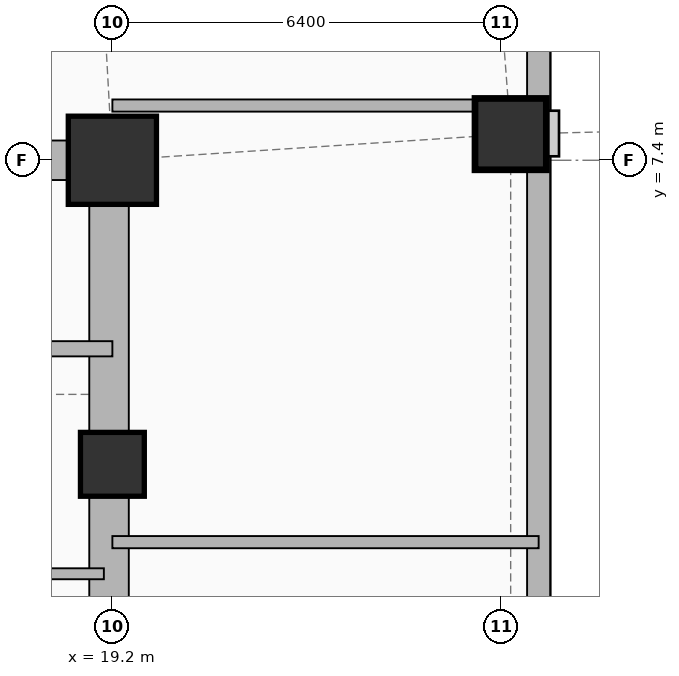
"""IFC4 building model, lengths in metres.
Left out: names, types, materials, properties, quantities, classifications, styles, units other than length and angle.
Written with IfcOpenShell. Run it as: python <this file> out.ifc"""

import sys

from ifc_helpers import new_model, si_unit, direction, frame, frame_2d, origin, origin_2d, place, context, subcontext, project, spatial, rectangle, hollow_rectangle, extrude, element, fill, save


model = new_model("IFC4")
c1 = context("Model", 3, precision=1e-05, world=origin(), true_north=direction((0.0, 1.0)))
c2 = subcontext(c1, "Body", "Model", "MODEL_VIEW")
j1 = project(units=[si_unit("LENGTHUNIT", "METRE"), si_unit("PLANEANGLEUNIT", "RADIAN")], contexts=[c1])
p1 = place(None, origin())
s1 = spatial("IfcSite", under=j1, at=p1, CompositionType="ELEMENT")
p2 = place(p1, origin())
s2 = spatial("IfcBuilding", under=s1, at=p2, CompositionType="ELEMENT")
p3 = place(p2, frame((0.0, 0.0, 80.6)))
s3 = spatial("IfcBuildingStorey", under=s2, at=p3, CompositionType="ELEMENT", Elevation=80.6)
p4 = place(p3, frame((19.2, 2.4, 0.0), z_axis=(0.0, 0.0, 1.0), x_axis=(1.0, 0.0, 0.0)))
e1 = element("IfcColumn", 1, at=p4, inside=s3, PredefinedType="COLUMN", context=c2, shape_type="SweptSolid", body=[
    extrude(rectangle(XDim=1.05, YDim=1.05, at=origin_2d()), origin(), (0.0, 0.0, 1.0), 5.2),
])
p5 = place(p3, frame((19.2, 7.4, 0.0), z_axis=(0.0, 0.0, 1.0), x_axis=(1.0, 0.0, 0.0)))
e2 = element("IfcColumn", 2, at=p5, inside=s3, PredefinedType="COLUMN", context=c2, shape_type="SweptSolid", body=[
    extrude(rectangle(XDim=1.45, YDim=1.45, at=origin_2d()), origin(), (0.0, 0.0, 1.0), 5.2),
])
p6 = place(p3, frame((12.075, 7.4, 0.0), z_axis=(0.0, 0.0, 1.0), x_axis=(1.0, 0.0, 0.0)))
e3 = element("IfcWall", 3, at=p6, inside=s3, PredefinedType="SHEAR", context=c2, shape_type="SweptSolid", body=[
    extrude(rectangle(XDim=7.45, YDim=0.65, at=frame_2d((3.725, 0.0))), origin(), (0.0, 0.0, 1.0), 4.8),
])
p7 = place(p3, frame((19.145, -7.4, 0.0), z_axis=(0.0, 0.0, 1.0), x_axis=(0.0, 1.0, 0.0)))
e4 = element("IfcWall", 4, at=p7, inside=s3, PredefinedType="SHEAR", context=c2, shape_type="SweptSolid", body=[
    extrude(rectangle(XDim=14.8, YDim=0.65, at=frame_2d((7.4, 0.0))), origin(), (0.0, 0.0, 1.0), 4.8),
])
p8 = place(p7, frame((10.6, 0.0, 0.0)))
e5 = element("IfcOpeningElement", 5, at=p8, cuts=e4, PredefinedType="OPENING", context=c2, shape_type="SweptSolid", body=[
    extrude(rectangle(XDim=0.9, YDim=2.05, at=frame_2d((0.45, 1.025))), frame((0.0, 0.335, 0.0), z_axis=(0.0, -1.0, 0.0), x_axis=(1.0, 0.0, 0.0)), (0.0, 0.0, 1.0), 0.67),
])
p9 = place(p3, frame((25.75, 7.83, 0.0), z_axis=(0.0, 0.0, 1.0), x_axis=(1.0, 0.0, 0.0)))
e6 = element("IfcColumn", 6, at=p9, inside=s3, PredefinedType="COLUMN", context=c2, shape_type="SweptSolid", body=[
    extrude(hollow_rectangle(XDim=1.15, YDim=1.15, WallThickness=0.04, at=origin_2d()), origin(), (0.0, 0.0, 1.0), 5.165),
])
p10 = place(p3, frame((26.21, 18.381, 0.0), z_axis=(0.0, 0.0, 1.0), x_axis=(0.0, -1.0, 0.0)))
e7 = element("IfcWall", 7, at=p10, inside=s3, PredefinedType="ELEMENTEDWALL", context=c2, shape_type="SweptSolid", body=[
    extrude(rectangle(XDim=36.763, YDim=0.38, at=frame_2d((18.381, 0.0))), origin(), (0.0, 0.0, 1.0), 3.69),
])
p11 = place(p10, frame((1.498, 0.0, 0.75)))
e8 = element("IfcOpeningElement", 8, at=p11, cuts=e7, PredefinedType="OPENING", context=c2, shape_type="SweptSolid", body=[
    extrude(rectangle(XDim=1.6, YDim=1.4, at=frame_2d((0.8, 0.7))), frame((0.0, 0.2, 0.0), z_axis=(0.0, -1.0, 0.0), x_axis=(1.0, 0.0, 0.0)), (0.0, 0.0, 1.0), 0.4),
])
p12 = place(p10, frame((6.093, 0.0, 0.75)))
e9 = element("IfcOpeningElement", 9, at=p12, cuts=e7, PredefinedType="OPENING", context=c2, shape_type="SweptSolid", body=[
    extrude(rectangle(XDim=1.6, YDim=1.4, at=frame_2d((0.8, 0.7))), frame((0.0, 0.2, 0.0), z_axis=(0.0, -1.0, 0.0), x_axis=(1.0, 0.0, 0.0)), (0.0, 0.0, 1.0), 0.4),
])
p13 = place(p10, frame((15.284, 0.0, 0.75)))
e10 = element("IfcOpeningElement", 10, at=p13, cuts=e7, PredefinedType="OPENING", context=c2, shape_type="SweptSolid", body=[
    extrude(rectangle(XDim=1.6, YDim=1.4, at=frame_2d((0.8, 0.7))), frame((0.0, 0.2, 0.0), z_axis=(0.0, -1.0, 0.0), x_axis=(1.0, 0.0, 0.0)), (0.0, 0.0, 1.0), 0.4),
])
p14 = place(p10, frame((19.879, 0.0, 0.75)))
e11 = element("IfcOpeningElement", 11, at=p14, cuts=e7, PredefinedType="OPENING", context=c2, shape_type="SweptSolid", body=[
    extrude(rectangle(XDim=1.6, YDim=1.4, at=frame_2d((0.8, 0.7))), frame((0.0, 0.2, 0.0), z_axis=(0.0, -1.0, 0.0), x_axis=(1.0, 0.0, 0.0)), (0.0, 0.0, 1.0), 0.4),
])
p15 = place(p10, frame((29.07, 0.0, 0.75)))
e12 = element("IfcOpeningElement", 12, at=p15, cuts=e7, PredefinedType="OPENING", context=c2, shape_type="SweptSolid", body=[
    extrude(rectangle(XDim=1.6, YDim=1.4, at=frame_2d((0.8, 0.7))), frame((0.0, 0.2, 0.0), z_axis=(0.0, -1.0, 0.0), x_axis=(1.0, 0.0, 0.0)), (0.0, 0.0, 1.0), 0.4),
])
p16 = place(p10, frame((33.665, 0.0, 0.75)))
e13 = element("IfcOpeningElement", 13, at=p16, cuts=e7, PredefinedType="OPENING", context=c2, shape_type="SweptSolid", body=[
    extrude(rectangle(XDim=1.6, YDim=1.4, at=frame_2d((0.8, 0.7))), frame((0.0, 0.2, 0.0), z_axis=(0.0, -1.0, 0.0), x_axis=(1.0, 0.0, 0.0)), (0.0, 0.0, 1.0), 0.4),
])
p17 = place(p3, frame((16.6, 4.3, 0.0), z_axis=(0.0, 0.0, 1.0), x_axis=(1.0, 0.0, 0.0)))
e14 = element("IfcWall", 14, at=p17, inside=s3, PredefinedType="SOLIDWALL", context=c2, shape_type="SweptSolid", body=[
    extrude(rectangle(XDim=2.6, YDim=0.25, at=frame_2d((1.3, 0.0))), origin(), (0.0, 0.0, 1.0), 4.8),
])
p18 = place(p3, frame((15.7, 0.6, 0.0), z_axis=(0.0, 0.0, 1.0), x_axis=(1.0, 0.0, 0.0)))
e15 = element("IfcWall", 15, at=p18, inside=s3, PredefinedType="PARTITIONING", context=c2, shape_type="SweptSolid", body=[
    extrude(rectangle(XDim=3.36, YDim=0.18, at=frame_2d((1.68, 0.0))), origin(), (0.0, 0.0, 1.0), 4.8),
])
p19 = place(p18, frame((1.155, 0.0, 0.0)))
e16 = element("IfcOpeningElement", 16, at=p19, cuts=e15, PredefinedType="OPENING", context=c2, shape_type="SweptSolid", body=[
    extrude(rectangle(XDim=1.05, YDim=2.05, at=frame_2d((0.525, 1.025))), frame((0.0, 0.1, 0.0), z_axis=(0.0, -1.0, 0.0), x_axis=(1.0, 0.0, 0.0)), (0.0, 0.0, 1.0), 0.2),
])
p20 = place(p3, frame((19.2, 1.12, 0.0), z_axis=(0.0, 0.0, 1.0), x_axis=(1.0, 0.0, 0.0)))
e17 = element("IfcWall", 17, at=p20, inside=s3, PredefinedType="PARTITIONING", context=c2, shape_type="SweptSolid", body=[
    extrude(rectangle(XDim=7.01, YDim=0.2, at=frame_2d((3.505, 0.0))), origin(), (0.0, 0.0, 1.0), 4.8),
])
p21 = place(p3, frame((19.2, 8.3, 0.0), z_axis=(0.0, 0.0, 1.0), x_axis=(1.0, 0.0, 0.0)))
e18 = element("IfcWall", 18, at=p21, inside=s3, PredefinedType="PARTITIONING", context=c2, shape_type="SweptSolid", body=[
    extrude(rectangle(XDim=7.01, YDim=0.2, at=frame_2d((3.505, 0.0))), origin(), (0.0, 0.0, 1.0), 3.69),
])
p22 = place(p13, origin())
e19 = element("IfcWindow", 19, at=p22, inside=s3, PartitioningType="SINGLE_PANEL", PredefinedType="WINDOW", context=c2, shape_type="SweptSolid", body=[
    extrude(rectangle(XDim=1.6, YDim=1.4, at=frame_2d((0.8, 0.7))), frame((0.0, 0.03, 0.0), z_axis=(0.0, -1.0, 0.0), x_axis=(1.0, 0.0, 0.0)), (0.0, 0.0, 1.0), 0.06),
])
fill(e10, e19)
p23 = place(p8, origin())
e20 = element("IfcDoor", 20, at=p23, inside=s3, OperationType="SINGLE_SWING_LEFT", PredefinedType="DOOR", context=c2, shape_type="SweptSolid", body=[
    extrude(rectangle(XDim=0.9, YDim=2.05, at=frame_2d((0.45, 1.025))), frame((0.0, 0.025, 0.0), z_axis=(0.0, -1.0, 0.0), x_axis=(1.0, 0.0, 0.0)), (0.0, 0.0, 1.0), 0.05),
])
fill(e5, e20)
save(model, sys.argv[1])
